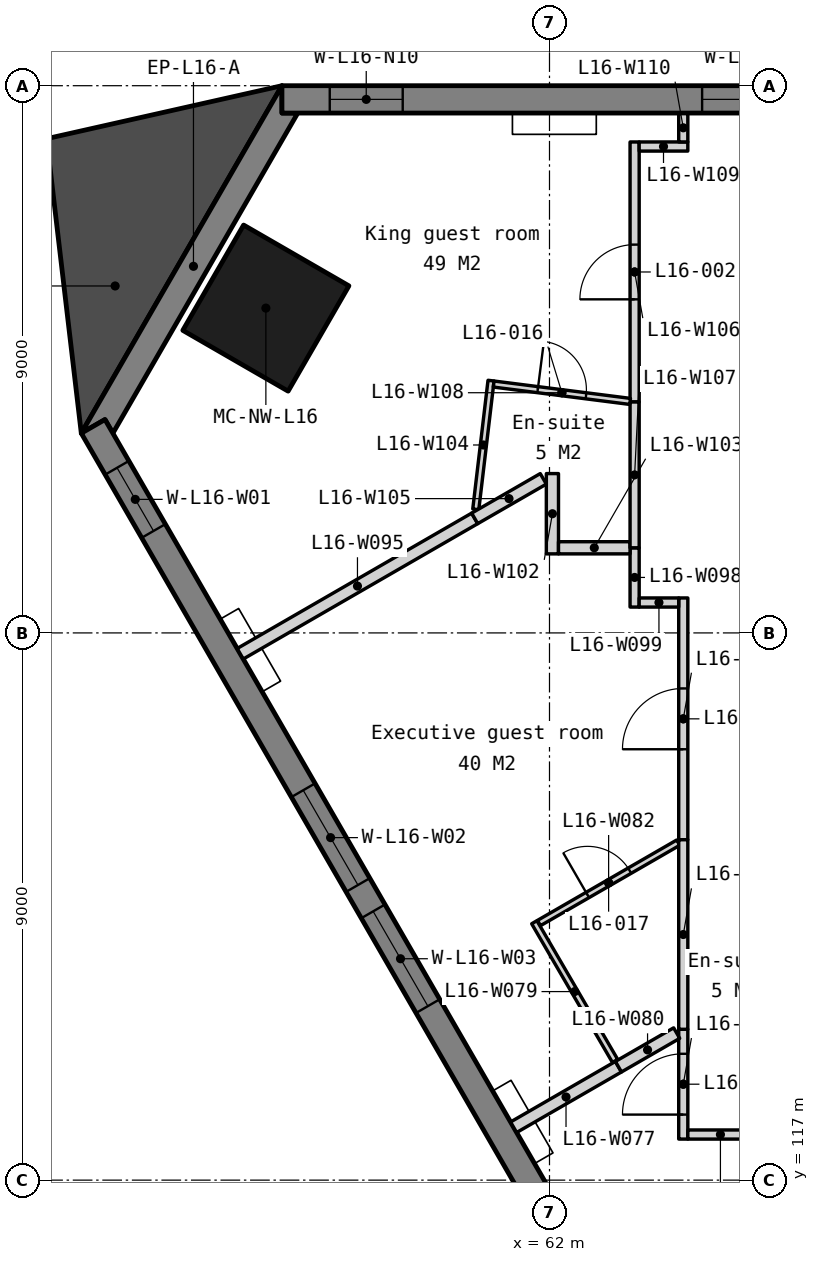
"""IFC4 building model, lengths in metres.
Left out: names, types, materials, properties, quantities, classifications, styles, units other than length and angle.
Written with IfcOpenShell. Run it as: python <this file> out.ifc"""

import sys

from ifc_helpers import new_model, si_unit, direction, frame, frame_2d, origin, origin_2d, place, context, subcontext, project, spatial, polyline, rectangle, outline, extrude, element, fill, save


model = new_model("IFC4")
c1 = context("Model", 3, precision=1e-05, world=origin(), true_north=direction((0.0, 1.0)))
c2 = subcontext(c1, "Body", "Model", "MODEL_VIEW")
j1 = project(units=[si_unit("LENGTHUNIT", "METRE"), si_unit("PLANEANGLEUNIT", "RADIAN")], contexts=[c1])
p1 = place(None, origin())
s1 = spatial("IfcSite", under=j1, at=p1, CompositionType="ELEMENT")
p2 = place(p1, origin())
s2 = spatial("IfcBuilding", under=s1, at=p2, CompositionType="ELEMENT")
p3 = place(p2, frame((0.0, 0.0, 70.0)))
s3 = spatial("IfcBuildingStorey", under=s2, at=p3, CompositionType="ELEMENT", Elevation=70.0)
p4 = place(p3, frame((57.336, 131.342, 0.0), z_axis=(0.0, 0.0, 1.0), x_axis=(-0.5, -0.866025403784, 0.0)))
e1 = element("IfcColumn", 1, at=p4, inside=s3, PredefinedType="COLUMN", context=c2, shape_type="SweptSolid", body=[
    extrude(rectangle(XDim=2.0, YDim=2.0, at=origin_2d()), origin(), (0.0, 0.0, 1.0), 3.5),
])
p5 = place(p3, frame((0.0, 0.0, -0.15)))
e2 = element("IfcWall", 2, at=p5, inside=s3, PredefinedType="SOLIDWALL", context=c2, shape_type="SweptSolid", body=[
    extrude(outline(polyline([(57.6, 135.0), (57.6, 134.55), (57.86, 134.55), (54.82, 129.284), (54.69, 129.509), (54.3, 129.284), (57.6, 135.0)])), origin(), (0.0, 0.0, 1.0), 3.5),
])
p6 = place(p3, frame((102.4, 134.775, -0.15), z_axis=(0.0, 0.0, 1.0), x_axis=(-1.0, 0.0, 0.0)))
e3 = element("IfcWall", 3, at=p6, inside=s3, PredefinedType="SOLIDWALL", context=c2, shape_type="SweptSolid", body=[
    extrude(outline(polyline([(44.8, 0.0), (44.8, 3.5), (0.0, 3.5), (0.0, 0.0), (44.8, 0.0)])), frame((0.0, 0.225, 0.0), z_axis=(0.0, -1.0, 0.0), x_axis=(1.0, 0.0, 0.0)), (0.0, 0.0, 1.0), 0.45),
])
p7 = place(p6, frame((0.786, 0.0, 1.05)))
e4 = element("IfcOpeningElement", 4, at=p7, cuts=e3, PredefinedType="OPENING", context=c2, shape_type="SweptSolid", body=[
    extrude(rectangle(XDim=1.2, YDim=1.5, at=frame_2d((0.6, 0.75))), frame((0.0, 0.235, 0.0), z_axis=(0.0, -1.0, 0.0), x_axis=(1.0, 0.0, 0.0)), (0.0, 0.0, 1.0), 0.47),
])
p8 = place(p6, frame((6.91, 0.0, 1.05)))
e5 = element("IfcOpeningElement", 5, at=p8, cuts=e3, PredefinedType="OPENING", context=c2, shape_type="SweptSolid", body=[
    extrude(rectangle(XDim=1.8, YDim=1.5, at=frame_2d((0.9, 0.75))), frame((0.0, 0.235, 0.0), z_axis=(0.0, -1.0, 0.0), x_axis=(1.0, 0.0, 0.0)), (0.0, 0.0, 1.0), 0.47),
])
p9 = place(p6, frame((9.21, 0.0, 1.05)))
e6 = element("IfcOpeningElement", 6, at=p9, cuts=e3, PredefinedType="OPENING", context=c2, shape_type="SweptSolid", body=[
    extrude(rectangle(XDim=1.8, YDim=1.5, at=frame_2d((0.9, 0.75))), frame((0.0, 0.235, 0.0), z_axis=(0.0, -1.0, 0.0), x_axis=(1.0, 0.0, 0.0)), (0.0, 0.0, 1.0), 0.47),
])
p10 = place(p6, frame((15.87, 0.0, 1.05)))
e7 = element("IfcOpeningElement", 7, at=p10, cuts=e3, PredefinedType="OPENING", context=c2, shape_type="SweptSolid", body=[
    extrude(rectangle(XDim=1.8, YDim=1.5, at=frame_2d((0.9, 0.75))), frame((0.0, 0.235, 0.0), z_axis=(0.0, -1.0, 0.0), x_axis=(1.0, 0.0, 0.0)), (0.0, 0.0, 1.0), 0.47),
])
p11 = place(p6, frame((18.17, 0.0, 1.05)))
e8 = element("IfcOpeningElement", 8, at=p11, cuts=e3, PredefinedType="OPENING", context=c2, shape_type="SweptSolid", body=[
    extrude(rectangle(XDim=1.8, YDim=1.5, at=frame_2d((0.9, 0.75))), frame((0.0, 0.235, 0.0), z_axis=(0.0, -1.0, 0.0), x_axis=(1.0, 0.0, 0.0)), (0.0, 0.0, 1.0), 0.47),
])
p12 = place(p6, frame((24.83, 0.0, 1.05)))
e9 = element("IfcOpeningElement", 9, at=p12, cuts=e3, PredefinedType="OPENING", context=c2, shape_type="SweptSolid", body=[
    extrude(rectangle(XDim=1.8, YDim=1.5, at=frame_2d((0.9, 0.75))), frame((0.0, 0.235, 0.0), z_axis=(0.0, -1.0, 0.0), x_axis=(1.0, 0.0, 0.0)), (0.0, 0.0, 1.0), 0.47),
])
p13 = place(p6, frame((27.13, 0.0, 1.05)))
e10 = element("IfcOpeningElement", 10, at=p13, cuts=e3, PredefinedType="OPENING", context=c2, shape_type="SweptSolid", body=[
    extrude(rectangle(XDim=1.8, YDim=1.5, at=frame_2d((0.9, 0.75))), frame((0.0, 0.235, 0.0), z_axis=(0.0, -1.0, 0.0), x_axis=(1.0, 0.0, 0.0)), (0.0, 0.0, 1.0), 0.47),
])
p14 = place(p6, frame((33.79, 0.0, 1.05)))
e11 = element("IfcOpeningElement", 11, at=p14, cuts=e3, PredefinedType="OPENING", context=c2, shape_type="SweptSolid", body=[
    extrude(rectangle(XDim=1.8, YDim=1.5, at=frame_2d((0.9, 0.75))), frame((0.0, 0.235, 0.0), z_axis=(0.0, -1.0, 0.0), x_axis=(1.0, 0.0, 0.0)), (0.0, 0.0, 1.0), 0.47),
])
p15 = place(p6, frame((36.09, 0.0, 1.05)))
e12 = element("IfcOpeningElement", 12, at=p15, cuts=e3, PredefinedType="OPENING", context=c2, shape_type="SweptSolid", body=[
    extrude(rectangle(XDim=1.8, YDim=1.5, at=frame_2d((0.9, 0.75))), frame((0.0, 0.235, 0.0), z_axis=(0.0, -1.0, 0.0), x_axis=(1.0, 0.0, 0.0)), (0.0, 0.0, 1.0), 0.47),
])
p16 = place(p6, frame((42.814, 0.0, 1.05)))
e13 = element("IfcOpeningElement", 13, at=p16, cuts=e3, PredefinedType="OPENING", context=c2, shape_type="SweptSolid", body=[
    extrude(rectangle(XDim=1.2, YDim=1.5, at=frame_2d((0.6, 0.75))), frame((0.0, 0.235, 0.0), z_axis=(0.0, -1.0, 0.0), x_axis=(1.0, 0.0, 0.0)), (0.0, 0.0, 1.0), 0.47),
])
p17 = place(p3, frame((54.495, 129.397, -0.15), z_axis=(0.0, 0.0, 1.0), x_axis=(0.499999201451, -0.866025864826, 0.0)))
e14 = element("IfcWall", 14, at=p17, inside=s3, PredefinedType="SOLIDWALL", context=c2, shape_type="SweptSolid", body=[
    extrude(outline(polyline([(44.8, 0.0), (44.8, 3.5), (0.0, 3.5), (0.0, 0.0), (44.8, 0.0)])), frame((0.0, 0.225, 0.0), z_axis=(0.0, -1.0, 0.0), x_axis=(1.0, 0.0, 0.0)), (0.0, 0.0, 1.0), 0.45),
])
p18 = place(p17, frame((0.786, 0.0, 1.05)))
e15 = element("IfcOpeningElement", 15, at=p18, cuts=e14, PredefinedType="OPENING", context=c2, shape_type="SweptSolid", body=[
    extrude(rectangle(XDim=1.2, YDim=1.5, at=frame_2d((0.6, 0.75))), frame((0.0, 0.235, 0.0), z_axis=(0.0, -1.0, 0.0), x_axis=(1.0, 0.0, 0.0)), (0.0, 0.0, 1.0), 0.47),
])
p19 = place(p17, frame((6.91, 0.0, 1.05)))
e16 = element("IfcOpeningElement", 16, at=p19, cuts=e14, PredefinedType="OPENING", context=c2, shape_type="SweptSolid", body=[
    extrude(rectangle(XDim=1.8, YDim=1.5, at=frame_2d((0.9, 0.75))), frame((0.0, 0.235, 0.0), z_axis=(0.0, -1.0, 0.0), x_axis=(1.0, 0.0, 0.0)), (0.0, 0.0, 1.0), 0.47),
])
p20 = place(p17, frame((9.21, 0.0, 1.05)))
e17 = element("IfcOpeningElement", 17, at=p20, cuts=e14, PredefinedType="OPENING", context=c2, shape_type="SweptSolid", body=[
    extrude(rectangle(XDim=1.8, YDim=1.5, at=frame_2d((0.9, 0.75))), frame((0.0, 0.235, 0.0), z_axis=(0.0, -1.0, 0.0), x_axis=(1.0, 0.0, 0.0)), (0.0, 0.0, 1.0), 0.47),
])
p21 = place(p17, frame((15.87, 0.0, 1.05)))
e18 = element("IfcOpeningElement", 18, at=p21, cuts=e14, PredefinedType="OPENING", context=c2, shape_type="SweptSolid", body=[
    extrude(rectangle(XDim=1.8, YDim=1.5, at=frame_2d((0.9, 0.75))), frame((0.0, 0.235, 0.0), z_axis=(0.0, -1.0, 0.0), x_axis=(1.0, 0.0, 0.0)), (0.0, 0.0, 1.0), 0.47),
])
p22 = place(p17, frame((18.17, 0.0, 1.05)))
e19 = element("IfcOpeningElement", 19, at=p22, cuts=e14, PredefinedType="OPENING", context=c2, shape_type="SweptSolid", body=[
    extrude(rectangle(XDim=1.8, YDim=1.5, at=frame_2d((0.9, 0.75))), frame((0.0, 0.235, 0.0), z_axis=(0.0, -1.0, 0.0), x_axis=(1.0, 0.0, 0.0)), (0.0, 0.0, 1.0), 0.47),
])
p23 = place(p17, frame((24.83, 0.0, 1.05)))
e20 = element("IfcOpeningElement", 20, at=p23, cuts=e14, PredefinedType="OPENING", context=c2, shape_type="SweptSolid", body=[
    extrude(rectangle(XDim=1.8, YDim=1.5, at=frame_2d((0.9, 0.75))), frame((0.0, 0.235, 0.0), z_axis=(0.0, -1.0, 0.0), x_axis=(1.0, 0.0, 0.0)), (0.0, 0.0, 1.0), 0.47),
])
p24 = place(p17, frame((27.13, 0.0, 1.05)))
e21 = element("IfcOpeningElement", 21, at=p24, cuts=e14, PredefinedType="OPENING", context=c2, shape_type="SweptSolid", body=[
    extrude(rectangle(XDim=1.8, YDim=1.5, at=frame_2d((0.9, 0.75))), frame((0.0, 0.235, 0.0), z_axis=(0.0, -1.0, 0.0), x_axis=(1.0, 0.0, 0.0)), (0.0, 0.0, 1.0), 0.47),
])
p25 = place(p17, frame((33.79, 0.0, 1.05)))
e22 = element("IfcOpeningElement", 22, at=p25, cuts=e14, PredefinedType="OPENING", context=c2, shape_type="SweptSolid", body=[
    extrude(rectangle(XDim=1.8, YDim=1.5, at=frame_2d((0.9, 0.75))), frame((0.0, 0.235, 0.0), z_axis=(0.0, -1.0, 0.0), x_axis=(1.0, 0.0, 0.0)), (0.0, 0.0, 1.0), 0.47),
])
p26 = place(p17, frame((36.09, 0.0, 1.05)))
e23 = element("IfcOpeningElement", 23, at=p26, cuts=e14, PredefinedType="OPENING", context=c2, shape_type="SweptSolid", body=[
    extrude(rectangle(XDim=1.8, YDim=1.5, at=frame_2d((0.9, 0.75))), frame((0.0, 0.235, 0.0), z_axis=(0.0, -1.0, 0.0), x_axis=(1.0, 0.0, 0.0)), (0.0, 0.0, 1.0), 0.47),
])
p27 = place(p17, frame((42.814, 0.0, 1.05)))
e24 = element("IfcOpeningElement", 24, at=p27, cuts=e14, PredefinedType="OPENING", context=c2, shape_type="SweptSolid", body=[
    extrude(rectangle(XDim=1.2, YDim=1.5, at=frame_2d((0.6, 0.75))), frame((0.0, 0.235, 0.0), z_axis=(0.0, -1.0, 0.0), x_axis=(1.0, 0.0, 0.0)), (0.0, 0.0, 1.0), 0.47),
])
p28 = place(p3, frame((0.0, 0.0, -0.15)))
e25 = element("IfcWall", 25, at=p28, inside=s3, PredefinedType="SOLIDWALL", context=c2, shape_type="SweptSolid", body=[
    extrude(outline(polyline([(57.6, 135.0), (53.73, 134.128), (54.3, 129.284), (57.6, 135.0)])), origin(), (0.0, 0.0, 1.0), 3.5),
])
p29 = place(p3, frame((64.2, 117.675, 0.0), z_axis=(0.0, 0.0, 1.0), x_axis=(0.0, 1.0, 0.0)))
e26 = element("IfcWall", 26, at=p29, inside=s3, PredefinedType="PARTITIONING", context=c2, shape_type="SweptSolid", body=[
    extrude(rectangle(XDim=1.806, YDim=0.15, at=frame_2d((0.903, 0.0))), origin(), (0.0, 0.0, 1.0), 3.35),
])
p30 = place(p29, frame((0.403, 0.0, 0.0)))
e27 = element("IfcOpeningElement", 27, at=p30, cuts=e26, PredefinedType="OPENING", context=c2, shape_type="SweptSolid", body=[
    extrude(rectangle(XDim=1.0, YDim=2.1, at=frame_2d((0.5, 1.05))), frame((0.0, 0.085, 0.0), z_axis=(0.0, -1.0, 0.0), x_axis=(1.0, 0.0, 0.0)), (0.0, 0.0, 1.0), 0.17),
])
p31 = place(p3, frame((64.275, 117.75, 0.0), z_axis=(0.0, 0.0, 1.0), x_axis=(1.0, 0.0, 0.0)))
e28 = element("IfcWall", 28, at=p31, inside=s3, PredefinedType="PARTITIONING", context=c2, shape_type="SweptSolid", body=[
    extrude(rectangle(XDim=1.072, YDim=0.15, at=frame_2d((0.536, 0.0))), origin(), (0.0, 0.0, 1.0), 3.35),
])
p32 = place(p3, frame((61.41, 117.87, 0.0), z_axis=(0.0, 0.0, 1.0), x_axis=(0.866038551572, 0.499977226672, 0.0)))
e29 = element("IfcWall", 29, at=p32, inside=s3, PredefinedType="PARTITIONING", context=c2, shape_type="SweptSolid", body=[
    extrude(rectangle(XDim=1.991, YDim=0.2, at=frame_2d((0.995, 0.0))), origin(), (0.0, 0.0, 1.0), 3.35),
])
p33 = place(p3, frame((61.75, 121.242, 0.0), z_axis=(0.0, 0.0, 1.0), x_axis=(0.503163628445, -0.86419116115, 0.0)))
e30 = element("IfcWall", 30, at=p33, inside=s3, PredefinedType="PARTITIONING", context=c2, shape_type="SweptSolid", body=[
    extrude(rectangle(XDim=2.64, YDim=0.1, at=frame_2d((1.32, 0.0))), origin(), (0.0, 0.0, 1.0), 3.35),
])
p34 = place(p3, frame((63.134, 118.865, 0.0), z_axis=(0.0, 0.0, 1.0), x_axis=(0.866075331272, 0.499913513082, 0.0)))
e31 = element("IfcWall", 31, at=p34, inside=s3, PredefinedType="PARTITIONING", context=c2, shape_type="SweptSolid", body=[
    extrude(rectangle(XDim=1.106, YDim=0.2, at=frame_2d((0.553, 0.0))), origin(), (0.0, 0.0, 1.0), 3.35),
])
p35 = place(p3, frame((61.827, 121.229, 0.0), z_axis=(0.0, 0.0, 1.0), x_axis=(0.86601342167, 0.500020753057, 0.0)))
e32 = element("IfcWall", 32, at=p35, inside=s3, PredefinedType="PARTITIONING", context=c2, shape_type="SweptSolid", body=[
    extrude(rectangle(XDim=2.645, YDim=0.1, at=frame_2d((1.323, 0.0))), origin(), (0.0, 0.0, 1.0), 3.35),
])
p36 = place(p35, frame((0.923, 0.0, 0.0)))
e33 = element("IfcOpeningElement", 33, at=p36, cuts=e32, PredefinedType="OPENING", context=c2, shape_type="SweptSolid", body=[
    extrude(rectangle(XDim=0.8, YDim=2.1, at=frame_2d((0.4, 1.05))), frame((0.0, 0.06, 0.0), z_axis=(0.0, -1.0, 0.0), x_axis=(1.0, 0.0, 0.0)), (0.0, 0.0, 1.0), 0.12),
])
p37 = place(p3, frame((64.2, 122.599, 0.0), z_axis=(0.0, 0.0, 1.0), x_axis=(0.0, 1.0, 0.0)))
e34 = element("IfcWall", 34, at=p37, inside=s3, PredefinedType="PARTITIONING", context=c2, shape_type="SweptSolid", body=[
    extrude(rectangle(XDim=3.976, YDim=0.15, at=frame_2d((1.988, 0.0))), origin(), (0.0, 0.0, 1.0), 3.35),
])
p38 = place(p37, frame((1.488, 0.0, 0.0)))
e35 = element("IfcOpeningElement", 35, at=p38, cuts=e34, PredefinedType="OPENING", context=c2, shape_type="SweptSolid", body=[
    extrude(rectangle(XDim=1.0, YDim=2.1, at=frame_2d((0.5, 1.05))), frame((0.0, 0.085, 0.0), z_axis=(0.0, -1.0, 0.0), x_axis=(1.0, 0.0, 0.0)), (0.0, 0.0, 1.0), 0.17),
])
p39 = place(p3, frame((64.2, 119.481, 0.0), z_axis=(0.0, 0.0, 1.0), x_axis=(0.0, 1.0, 0.0)))
e36 = element("IfcWall", 36, at=p39, inside=s3, PredefinedType="PARTITIONING", context=c2, shape_type="SweptSolid", body=[
    extrude(rectangle(XDim=3.118, YDim=0.15, at=frame_2d((1.559, 0.0))), origin(), (0.0, 0.0, 1.0), 3.35),
])
p40 = place(p3, frame((56.914, 125.657, 0.0), z_axis=(0.0, 0.0, 1.0), x_axis=(0.866007538022, 0.500030943131, 0.0)))
e37 = element("IfcWall", 37, at=p40, inside=s3, PredefinedType="PARTITIONING", context=c2, shape_type="SweptSolid", body=[
    extrude(rectangle(XDim=4.453, YDim=0.2, at=frame_2d((2.227, 0.0))), origin(), (0.0, 0.0, 1.0), 3.35),
])
p41 = place(p3, frame((63.4, 126.425, 0.0), z_axis=(0.0, 0.0, 1.0), x_axis=(0.0, 1.0, 0.0)))
e38 = element("IfcWall", 38, at=p41, inside=s3, PredefinedType="PARTITIONING", context=c2, shape_type="SweptSolid", body=[
    extrude(rectangle(XDim=0.975, YDim=0.15, at=frame_2d((0.487, 0.0))), origin(), (0.0, 0.0, 1.0), 3.35),
])
p42 = place(p3, frame((63.475, 126.5, 0.0), z_axis=(0.0, 0.0, 1.0), x_axis=(1.0, 0.0, 0.0)))
e39 = element("IfcWall", 39, at=p42, inside=s3, PredefinedType="PARTITIONING", context=c2, shape_type="SweptSolid", body=[
    extrude(rectangle(XDim=0.65, YDim=0.15, at=frame_2d((0.325, 0.0))), origin(), (0.0, 0.0, 1.0), 3.35),
])
p43 = place(p3, frame((62.048, 127.3, 0.0), z_axis=(0.0, 0.0, 1.0), x_axis=(0.0, 1.0, 0.0)))
e40 = element("IfcWall", 40, at=p43, inside=s3, PredefinedType="PARTITIONING", context=c2, shape_type="SweptSolid", body=[
    extrude(rectangle(XDim=1.321, YDim=0.2, at=frame_2d((0.66, 0.0))), origin(), (0.0, 0.0, 1.0), 3.35),
])
p44 = place(p3, frame((62.148, 127.4, 0.0), z_axis=(0.0, 0.0, 1.0), x_axis=(1.0, 0.0, 0.0)))
e41 = element("IfcWall", 41, at=p44, inside=s3, PredefinedType="PARTITIONING", context=c2, shape_type="SweptSolid", body=[
    extrude(rectangle(XDim=1.177, YDim=0.2, at=frame_2d((0.588, 0.0))), origin(), (0.0, 0.0, 1.0), 3.35),
])
p45 = place(p3, frame((60.788, 128.032, 0.0), z_axis=(0.0, 0.0, 1.0), x_axis=(0.117744993375, 0.993043864356, 0.0)))
e42 = element("IfcWall", 42, at=p45, inside=s3, PredefinedType="PARTITIONING", context=c2, shape_type="SweptSolid", body=[
    extrude(rectangle(XDim=2.132, YDim=0.1, at=frame_2d((1.066, 0.0))), origin(), (0.0, 0.0, 1.0), 3.35),
])
p46 = place(p3, frame((60.77, 127.884, 0.0), z_axis=(0.0, 0.0, 1.0), x_axis=(0.86634472317, 0.499446514288, 0.0)))
e43 = element("IfcWall", 43, at=p46, inside=s3, PredefinedType="PARTITIONING", context=c2, shape_type="SweptSolid", body=[
    extrude(rectangle(XDim=1.302, YDim=0.2, at=frame_2d((0.651, 0.0))), origin(), (0.0, 0.0, 1.0), 3.35),
])
p47 = place(p3, frame((63.4, 129.798, 0.0), z_axis=(0.0, 0.0, 1.0), x_axis=(0.0, 1.0, 0.0)))
e44 = element("IfcWall", 44, at=p47, inside=s3, PredefinedType="PARTITIONING", context=c2, shape_type="SweptSolid", body=[
    extrude(rectangle(XDim=4.276, YDim=0.15, at=frame_2d((2.138, 0.0))), origin(), (0.0, 0.0, 1.0), 3.35),
])
p48 = place(p47, frame((1.688, 0.0, 0.0)))
e45 = element("IfcOpeningElement", 45, at=p48, cuts=e44, PredefinedType="OPENING", context=c2, shape_type="SweptSolid", body=[
    extrude(rectangle(XDim=0.9, YDim=2.1, at=frame_2d((0.45, 1.05))), frame((0.0, 0.085, 0.0), z_axis=(0.0, -1.0, 0.0), x_axis=(1.0, 0.0, 0.0)), (0.0, 0.0, 1.0), 0.17),
])
p49 = place(p3, frame((63.4, 127.4, 0.0), z_axis=(0.0, 0.0, 1.0), x_axis=(0.0, 1.0, 0.0)))
e46 = element("IfcWall", 46, at=p49, inside=s3, PredefinedType="PARTITIONING", context=c2, shape_type="SweptSolid", body=[
    extrude(rectangle(XDim=2.398, YDim=0.15, at=frame_2d((1.199, 0.0))), origin(), (0.0, 0.0, 1.0), 3.35),
])
p50 = place(p3, frame((61.082, 130.093, 0.0), z_axis=(0.0, 0.0, 1.0), x_axis=(0.99199127296, -0.126306430445, 0.0)))
e47 = element("IfcWall", 47, at=p50, inside=s3, PredefinedType="PARTITIONING", context=c2, shape_type="SweptSolid", body=[
    extrude(rectangle(XDim=2.261, YDim=0.1, at=frame_2d((1.131, 0.0))), origin(), (0.0, 0.0, 1.0), 3.35),
])
p51 = place(p50, frame((0.731, 0.0, 0.0)))
e48 = element("IfcOpeningElement", 48, at=p51, cuts=e47, PredefinedType="OPENING", context=c2, shape_type="SweptSolid", body=[
    extrude(rectangle(XDim=0.8, YDim=2.1, at=frame_2d((0.4, 1.05))), frame((0.0, 0.06, 0.0), z_axis=(0.0, -1.0, 0.0), x_axis=(1.0, 0.0, 0.0)), (0.0, 0.0, 1.0), 0.12),
])
p52 = place(p3, frame((63.475, 134.0, 0.0), z_axis=(0.0, 0.0, 1.0), x_axis=(0.999999813645, 0.000610500497, 0.0)))
e49 = element("IfcWall", 49, at=p52, inside=s3, PredefinedType="PARTITIONING", context=c2, shape_type="SweptSolid", body=[
    extrude(rectangle(XDim=0.8, YDim=0.15, at=frame_2d((0.4, 0.0))), origin(), (0.0, 0.0, 1.0), 2.887),
])
p53 = place(p3, frame((64.2, 134.075, 0.0), z_axis=(0.0, 0.0, 1.0), x_axis=(0.0, 1.0, 0.0)))
e50 = element("IfcWall", 50, at=p53, inside=s3, PredefinedType="PARTITIONING", context=c2, shape_type="SweptSolid", body=[
    extrude(rectangle(XDim=0.465, YDim=0.15, at=frame_2d((0.232, 0.0))), origin(), (0.0, 0.0, 1.0), 3.35),
])
p54 = place(p15, origin())
e51 = element("IfcWindow", 51, at=p54, inside=s3, PartitioningType="SINGLE_PANEL", PredefinedType="WINDOW", context=c2, shape_type="SweptSolid", body=[
    extrude(rectangle(XDim=1.8, YDim=1.5, at=frame_2d((0.9, 0.75))), frame((0.0, 0.03, 0.0), z_axis=(0.0, -1.0, 0.0), x_axis=(1.0, 0.0, 0.0)), (0.0, 0.0, 1.0), 0.06),
])
fill(e12, e51)
p55 = place(p16, origin())
e52 = element("IfcWindow", 52, at=p55, inside=s3, PartitioningType="SINGLE_PANEL", PredefinedType="WINDOW", context=c2, shape_type="SweptSolid", body=[
    extrude(rectangle(XDim=1.2, YDim=1.5, at=frame_2d((0.6, 0.75))), frame((0.0, 0.03, 0.0), z_axis=(0.0, -1.0, 0.0), x_axis=(1.0, 0.0, 0.0)), (0.0, 0.0, 1.0), 0.06),
])
fill(e13, e52)
p56 = place(p18, origin())
e53 = element("IfcWindow", 53, at=p56, inside=s3, PartitioningType="SINGLE_PANEL", PredefinedType="WINDOW", context=c2, shape_type="SweptSolid", body=[
    extrude(rectangle(XDim=1.2, YDim=1.5, at=frame_2d((0.6, 0.75))), frame((0.0, 0.03, 0.0), z_axis=(0.0, -1.0, 0.0), x_axis=(1.0, 0.0, 0.0)), (0.0, 0.0, 1.0), 0.06),
])
fill(e15, e53)
p57 = place(p19, origin())
e54 = element("IfcWindow", 54, at=p57, inside=s3, PartitioningType="SINGLE_PANEL", PredefinedType="WINDOW", context=c2, shape_type="SweptSolid", body=[
    extrude(rectangle(XDim=1.8, YDim=1.5, at=frame_2d((0.9, 0.75))), frame((0.0, 0.03, 0.0), z_axis=(0.0, -1.0, 0.0), x_axis=(1.0, 0.0, 0.0)), (0.0, 0.0, 1.0), 0.06),
])
fill(e16, e54)
p58 = place(p20, origin())
e55 = element("IfcWindow", 55, at=p58, inside=s3, PartitioningType="SINGLE_PANEL", PredefinedType="WINDOW", context=c2, shape_type="SweptSolid", body=[
    extrude(rectangle(XDim=1.8, YDim=1.5, at=frame_2d((0.9, 0.75))), frame((0.0, 0.03, 0.0), z_axis=(0.0, -1.0, 0.0), x_axis=(1.0, 0.0, 0.0)), (0.0, 0.0, 1.0), 0.06),
])
fill(e17, e55)
p59 = place(p48, origin())
e56 = element("IfcDoor", 56, at=p59, inside=s3, OperationType="SINGLE_SWING_LEFT", PredefinedType="DOOR", context=c2, shape_type="SweptSolid", body=[
    extrude(rectangle(XDim=0.9, YDim=2.1, at=frame_2d((0.45, 1.05))), frame((0.0, 0.025, 0.0), z_axis=(0.0, -1.0, 0.0), x_axis=(1.0, 0.0, 0.0)), (0.0, 0.0, 1.0), 0.05),
])
fill(e45, e56)
p60 = place(p38, origin())
e57 = element("IfcDoor", 57, at=p60, inside=s3, OperationType="SINGLE_SWING_LEFT", PredefinedType="DOOR", context=c2, shape_type="SweptSolid", body=[
    extrude(rectangle(XDim=1.0, YDim=2.1, at=frame_2d((0.5, 1.05))), frame((0.0, 0.025, 0.0), z_axis=(0.0, -1.0, 0.0), x_axis=(1.0, 0.0, 0.0)), (0.0, 0.0, 1.0), 0.05),
])
fill(e35, e57)
p61 = place(p30, origin())
e58 = element("IfcDoor", 58, at=p61, inside=s3, OperationType="SINGLE_SWING_LEFT", PredefinedType="DOOR", context=c2, shape_type="SweptSolid", body=[
    extrude(rectangle(XDim=1.0, YDim=2.1, at=frame_2d((0.5, 1.05))), frame((0.0, 0.025, 0.0), z_axis=(0.0, -1.0, 0.0), x_axis=(1.0, 0.0, 0.0)), (0.0, 0.0, 1.0), 0.05),
])
fill(e27, e58)
p62 = place(p51, origin())
e59 = element("IfcDoor", 59, at=p62, inside=s3, OperationType="SINGLE_SWING_LEFT", PredefinedType="DOOR", context=c2, shape_type="SweptSolid", body=[
    extrude(rectangle(XDim=0.8, YDim=2.1, at=frame_2d((0.4, 1.05))), frame((0.0, 0.025, 0.0), z_axis=(0.0, -1.0, 0.0), x_axis=(1.0, 0.0, 0.0)), (0.0, 0.0, 1.0), 0.05),
])
fill(e48, e59)
p63 = place(p36, origin())
e60 = element("IfcDoor", 60, at=p63, inside=s3, OperationType="SINGLE_SWING_LEFT", PredefinedType="DOOR", context=c2, shape_type="SweptSolid", body=[
    extrude(rectangle(XDim=0.8, YDim=2.1, at=frame_2d((0.4, 1.05))), frame((0.0, 0.025, 0.0), z_axis=(0.0, -1.0, 0.0), x_axis=(1.0, 0.0, 0.0)), (0.0, 0.0, 1.0), 0.05),
])
fill(e33, e60)
save(model, sys.argv[1])
